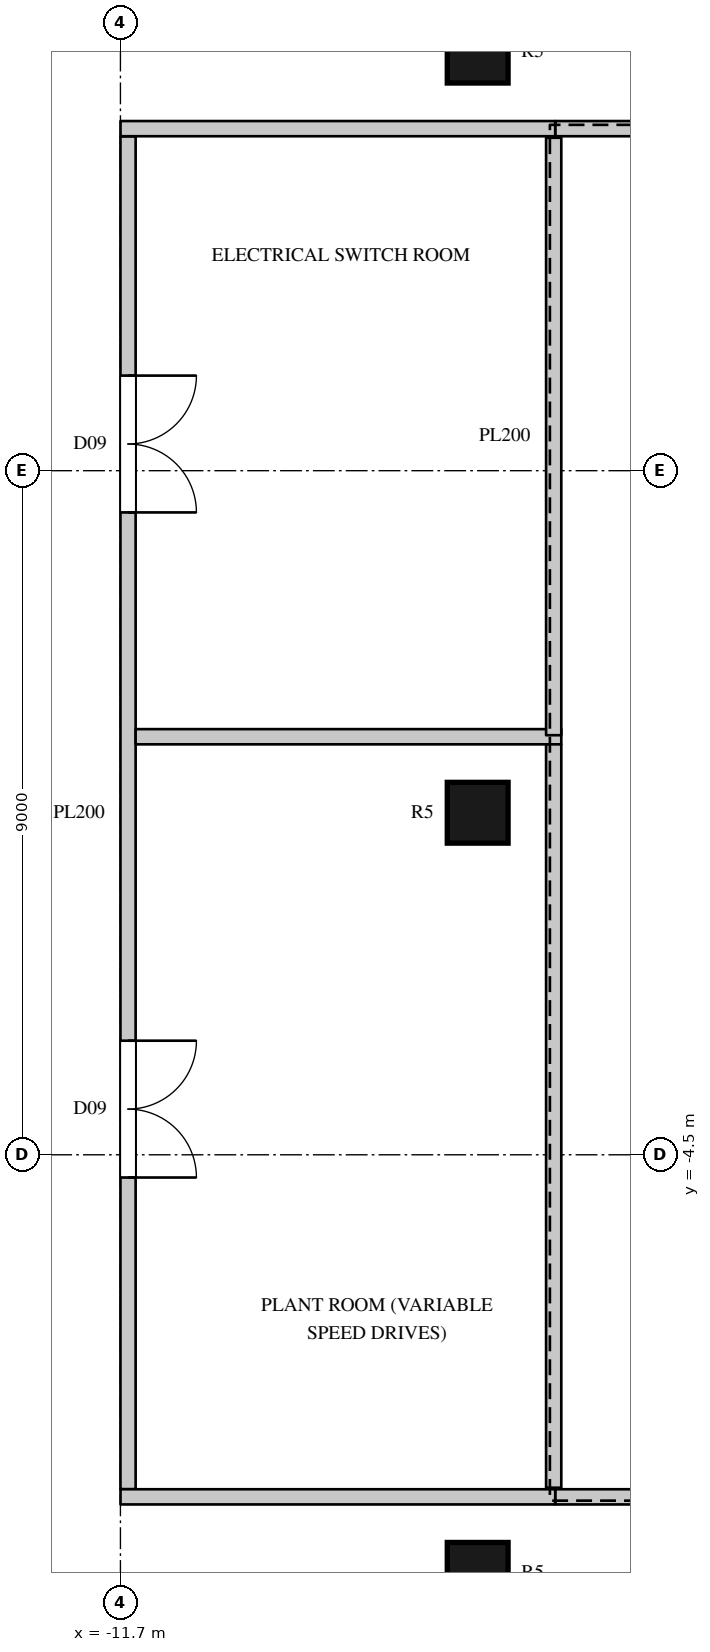
"""IFC4 building model, lengths in metres.
Left out: names, types, materials, properties, quantities, classifications, styles, units other than length and angle.
Written with IfcOpenShell. Run it as: python <this file> out.ifc"""

import sys

from ifc_helpers import new_model, si_unit, direction, frame, frame_2d, origin, origin_2d, place, context, subcontext, project, spatial, rectangle, circle, extrude, element, fill, save


model = new_model("IFC4")
c1 = context("Model", 3, precision=1e-05, world=origin(), true_north=direction((0.0, 1.0)))
c2 = subcontext(c1, "Body", "Model", "MODEL_VIEW")
j1 = project(units=[si_unit("LENGTHUNIT", "METRE"), si_unit("PLANEANGLEUNIT", "RADIAN")], contexts=[c1])
p1 = place(None, origin())
s1 = spatial("IfcSite", under=j1, at=p1, CompositionType="ELEMENT")
p2 = place(p1, origin())
s2 = spatial("IfcBuilding", under=s1, at=p2, CompositionType="ELEMENT")
p3 = place(p2, frame((0.0, 0.0, 339.0)))
s3 = spatial("IfcBuildingStorey", under=s2, at=p3, CompositionType="ELEMENT", Elevation=339.0)
for number, where, z_axis, x_axis in (
    (1, (-7.0, -10.0, 0.0), (0.0, 0.0, 1.0), (1.0, 0.0, 0.0)),
    (2, (-7.0, 0.0, 0.0), (0.0, 0.0, 1.0), (1.0, 0.0, 0.0)),
    (3, (-7.0, 10.0, 0.0), (0.0, 0.0, 1.0), (1.0, 0.0, 0.0)),
):
    element("IfcColumn", number, at=place(p3, frame(where, z_axis=z_axis, x_axis=x_axis)), inside=s3, PredefinedType="COLUMN", context=c2, shape_type="SweptSolid", body=[
        extrude(circle(Radius=0.4, at=origin_2d()), origin(), (0.0, 0.0, 1.0), 4.0),
    ])
for number, where, z_axis, x_axis in (
    (4, (-5.98, -9.0, 0.0), (0.0, 0.0, 1.0), (1.0, 0.0, 0.0)),
    (5, (-5.98, 9.0, 0.0), (0.0, 0.0, 1.0), (1.0, 0.0, 0.0)),
):
    element("IfcWall", number, at=place(p3, frame(where, z_axis=z_axis, x_axis=x_axis)), inside=s3, PredefinedType="PARTITIONING", context=c2, shape_type="SweptSolid", body=[
        extrude(rectangle(XDim=13.96, YDim=0.2, at=frame_2d((6.98, 0.0))), origin(), (0.0, 0.0, 1.0), 3.598),
    ])
p4 = place(p3, frame((-11.6, -8.899, 0.0), z_axis=(0.0, 0.0, 1.0), x_axis=(0.0, 1.0, 0.0)))
e6 = element("IfcWall", 6, at=p4, inside=s3, PredefinedType="PARTITIONING", context=c2, shape_type="SweptSolid", body=[
    extrude(rectangle(XDim=17.798, YDim=0.2, at=frame_2d((8.899, 0.0))), origin(), (0.0, 0.0, 1.0), 3.05),
])
p5 = place(p4, frame((4.1, 0.0, 0.0)))
e7 = element("IfcOpeningElement", 7, at=p5, cuts=e6, PredefinedType="OPENING", context=c2, shape_type="SweptSolid", body=[
    extrude(rectangle(XDim=1.8, YDim=2.4, at=frame_2d((0.9, 1.2))), frame((0.0, 0.11, 0.0), z_axis=(0.0, -1.0, 0.0), x_axis=(1.0, 0.0, 0.0)), (0.0, 0.0, 1.0), 0.22),
])
p6 = place(p4, frame((12.85, 0.0, 0.0)))
e8 = element("IfcOpeningElement", 8, at=p6, cuts=e6, PredefinedType="OPENING", context=c2, shape_type="SweptSolid", body=[
    extrude(rectangle(XDim=1.8, YDim=2.4, at=frame_2d((0.9, 1.2))), frame((0.0, 0.11, 0.0), z_axis=(0.0, -1.0, 0.0), x_axis=(1.0, 0.0, 0.0)), (0.0, 0.0, 1.0), 0.22),
])
p7 = place(p3, frame((-11.5, 1.0, 0.0), z_axis=(0.0, 0.0, 1.0), x_axis=(1.0, 0.0, 0.0)))
e9 = element("IfcWall", 9, at=p7, inside=s3, PredefinedType="PARTITIONING", context=c2, shape_type="SweptSolid", body=[
    extrude(rectangle(XDim=5.6, YDim=0.2, at=frame_2d((2.8, 0.0))), origin(), (0.0, 0.0, 1.0), 3.598),
])
for number, where, z_axis, x_axis in (
    (10, (-11.699, -9.0, 0.0), (0.0, 0.0, 1.0), (1.0, 0.0, 0.0)),
    (11, (-11.699, 9.0, 0.0), (0.0, 0.0, 1.0), (1.0, 0.0, 0.0)),
):
    element("IfcWall", number, at=place(p3, frame(where, z_axis=z_axis, x_axis=x_axis)), inside=s3, PredefinedType="PARTITIONING", context=c2, shape_type="SweptSolid", body=[
        extrude(rectangle(XDim=5.719, YDim=0.2, at=frame_2d((2.859, 0.0))), origin(), (0.0, 0.0, 1.0), 3.598),
    ])
p8 = place(p3, frame((-6.0, -8.88, 0.0), z_axis=(0.0, 0.0, 1.0), x_axis=(0.0, 1.0, 0.0)))
e12 = element("IfcWall", 12, at=p8, inside=s3, PredefinedType="PARTITIONING", context=c2, shape_type="SweptSolid", body=[
    extrude(rectangle(XDim=9.78, YDim=0.2, at=frame_2d((4.89, 0.0))), origin(), (0.0, 0.0, 1.0), 3.598),
])
p9 = place(p3, frame((-6.0, 1.02, 0.0), z_axis=(0.0, 0.0, 1.0), x_axis=(0.0, 1.0, 0.0)))
e13 = element("IfcWall", 13, at=p9, inside=s3, PredefinedType="PARTITIONING", context=c2, shape_type="SweptSolid", body=[
    extrude(rectangle(XDim=7.86, YDim=0.2, at=frame_2d((3.93, 0.0))), origin(), (0.0, 0.0, 1.0), 3.598),
])
p10 = place(p5, origin())
e14 = element("IfcDoor", 14, at=p10, inside=s3, OperationType="DOUBLE_DOOR_SINGLE_SWING", PredefinedType="DOOR", context=c2, shape_type="SweptSolid", body=[
    extrude(rectangle(XDim=1.8, YDim=2.4, at=frame_2d((0.9, 1.2))), frame((0.0, 0.025, 0.0), z_axis=(0.0, -1.0, 0.0), x_axis=(1.0, 0.0, 0.0)), (0.0, 0.0, 1.0), 0.05),
])
fill(e7, e14)
p11 = place(p6, origin())
e15 = element("IfcDoor", 15, at=p11, inside=s3, OperationType="DOUBLE_DOOR_SINGLE_SWING", PredefinedType="DOOR", context=c2, shape_type="SweptSolid", body=[
    extrude(rectangle(XDim=1.8, YDim=2.4, at=frame_2d((0.9, 1.2))), frame((0.0, 0.025, 0.0), z_axis=(0.0, -1.0, 0.0), x_axis=(1.0, 0.0, 0.0)), (0.0, 0.0, 1.0), 0.05),
])
fill(e8, e15)
save(model, sys.argv[1])
